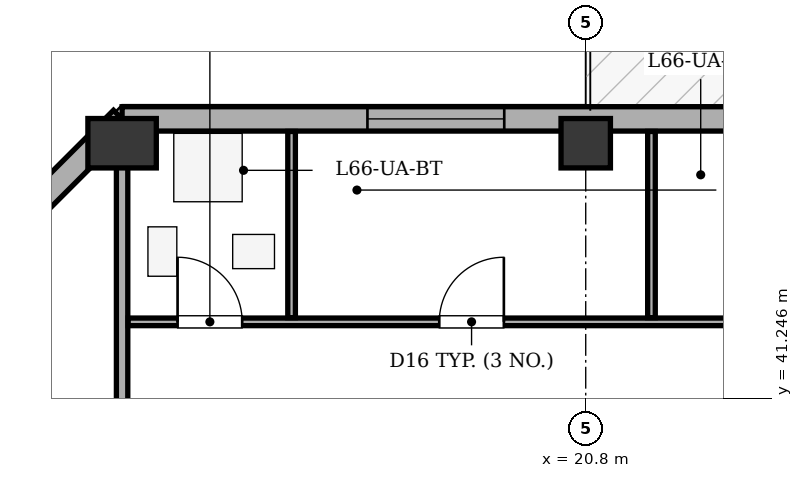
"""IFC4 building model, lengths in metres.
Left out: names, types, materials, properties, quantities, classifications, styles, units other than length and angle.
Written with IfcOpenShell. Run it as: python <this file> out.ifc"""

import sys

from ifc_helpers import new_model, si_unit, direction, frame, frame_2d, origin, origin_2d, place, context, subcontext, project, spatial, rectangle, extrude, element, fill, save


model = new_model("IFC4")
c1 = context("Model", 3, precision=1e-05, world=origin(), true_north=direction((0.0, 1.0)))
c2 = subcontext(c1, "Body", "Model", "MODEL_VIEW")
j1 = project(units=[si_unit("LENGTHUNIT", "METRE"), si_unit("PLANEANGLEUNIT", "RADIAN")], contexts=[c1])
p1 = place(None, origin())
s1 = spatial("IfcSite", under=j1, at=p1, CompositionType="ELEMENT")
p2 = place(p1, origin())
s2 = spatial("IfcBuilding", under=s1, at=p2, CompositionType="ELEMENT")
p3 = place(p2, frame((0.0, 0.0, 251.7)))
s3 = spatial("IfcBuildingStorey", under=s2, at=p3, CompositionType="ELEMENT", Elevation=251.7)
p4 = place(p3, frame((14.7, 44.6, 0.0), z_axis=(0.0, 0.0, 1.0), x_axis=(1.0, 0.0, 0.0)))
e1 = element("IfcColumn", 1, at=p4, inside=s3, PredefinedType="COLUMN", context=c2, shape_type="SweptSolid", body=[
    extrude(rectangle(XDim=0.65, YDim=0.9, at=origin_2d()), origin(), (0.0, 0.0, 1.0), 3.4),
])
p5 = place(p3, frame((20.8, 44.6, 0.0), z_axis=(0.0, 0.0, 1.0), x_axis=(1.0, 0.0, 0.0)))
e2 = element("IfcColumn", 2, at=p5, inside=s3, PredefinedType="COLUMN", context=c2, shape_type="SweptSolid", body=[
    extrude(rectangle(XDim=0.65, YDim=0.65, at=origin_2d()), origin(), (0.0, 0.0, 1.0), 3.4),
])
p6 = place(p3, frame((10.88, 41.1, 0.0), z_axis=(0.0, 0.0, 1.0), x_axis=(0.70712937715, 0.707084184501, 0.0)))
e3 = element("IfcWall", 3, at=p6, inside=s3, PredefinedType="STANDARD", context=c2, shape_type="SweptSolid", body=[
    extrude(rectangle(XDim=5.402, YDim=0.32, at=frame_2d((2.701, 0.0))), origin(), (0.0, 0.0, 1.0), 2.725),
])
p7 = place(p6, frame((2.001, 0.0, 0.75)))
e4 = element("IfcOpeningElement", 4, at=p7, cuts=e3, PredefinedType="OPENING", context=c2, shape_type="SweptSolid", body=[
    extrude(rectangle(XDim=1.4, YDim=1.65, at=frame_2d((0.7, 0.825))), frame((0.0, 0.17, 0.0), z_axis=(0.0, -1.0, 0.0), x_axis=(1.0, 0.0, 0.0)), (0.0, 0.0, 1.0), 0.34),
])
p8 = place(p3, frame((14.7, 44.92, 0.0), z_axis=(0.0, 0.0, 1.0), x_axis=(1.0, 0.0, 0.0)))
e5 = element("IfcWall", 5, at=p8, inside=s3, PredefinedType="STANDARD", context=c2, shape_type="SweptSolid", body=[
    extrude(rectangle(XDim=37.0, YDim=0.32, at=frame_2d((18.5, 0.0))), origin(), (0.0, 0.0, 1.0), 2.725),
])
p9 = place(p8, frame((9.0, 0.0, 0.0)))
e6 = element("IfcOpeningElement", 6, at=p9, cuts=e5, PredefinedType="OPENING", context=c2, shape_type="SweptSolid", body=[
    extrude(rectangle(XDim=1.0, YDim=2.02, at=frame_2d((0.5, 1.01))), frame((0.0, 0.17, 0.0), z_axis=(0.0, -1.0, 0.0), x_axis=(1.0, 0.0, 0.0)), (0.0, 0.0, 1.0), 0.34),
])
p10 = place(p8, frame((3.228, 0.0, 0.75)))
e7 = element("IfcOpeningElement", 7, at=p10, cuts=e5, PredefinedType="OPENING", context=c2, shape_type="SweptSolid", body=[
    extrude(rectangle(XDim=1.8, YDim=1.7, at=frame_2d((0.9, 0.85))), frame((0.0, 0.17, 0.0), z_axis=(0.0, -1.0, 0.0), x_axis=(1.0, 0.0, 0.0)), (0.0, 0.0, 1.0), 0.34),
])
p11 = place(p8, frame((17.392, 0.0, 0.75)))
e8 = element("IfcOpeningElement", 8, at=p11, cuts=e5, PredefinedType="OPENING", context=c2, shape_type="SweptSolid", body=[
    extrude(rectangle(XDim=1.8, YDim=1.7, at=frame_2d((0.9, 0.85))), frame((0.0, 0.17, 0.0), z_axis=(0.0, -1.0, 0.0), x_axis=(1.0, 0.0, 0.0)), (0.0, 0.0, 1.0), 0.34),
])
p12 = place(p8, frame((23.228, 0.0, 0.75)))
e9 = element("IfcOpeningElement", 9, at=p12, cuts=e5, PredefinedType="OPENING", context=c2, shape_type="SweptSolid", body=[
    extrude(rectangle(XDim=1.8, YDim=1.7, at=frame_2d((0.9, 0.85))), frame((0.0, 0.17, 0.0), z_axis=(0.0, -1.0, 0.0), x_axis=(1.0, 0.0, 0.0)), (0.0, 0.0, 1.0), 0.34),
])
p13 = place(p8, frame((27.316, 0.0, 0.75)))
e10 = element("IfcOpeningElement", 10, at=p13, cuts=e5, PredefinedType="OPENING", context=c2, shape_type="SweptSolid", body=[
    extrude(rectangle(XDim=1.8, YDim=1.7, at=frame_2d((0.9, 0.85))), frame((0.0, 0.17, 0.0), z_axis=(0.0, -1.0, 0.0), x_axis=(1.0, 0.0, 0.0)), (0.0, 0.0, 1.0), 0.34),
])
p14 = place(p8, frame((31.315, 0.0, 0.75)))
e11 = element("IfcOpeningElement", 11, at=p14, cuts=e5, PredefinedType="OPENING", context=c2, shape_type="SweptSolid", body=[
    extrude(rectangle(XDim=1.8, YDim=1.7, at=frame_2d((0.9, 0.85))), frame((0.0, 0.17, 0.0), z_axis=(0.0, -1.0, 0.0), x_axis=(1.0, 0.0, 0.0)), (0.0, 0.0, 1.0), 0.34),
])
p15 = place(p8, frame((33.965, 0.0, 0.75)))
e12 = element("IfcOpeningElement", 12, at=p15, cuts=e5, PredefinedType="OPENING", context=c2, shape_type="SweptSolid", body=[
    extrude(rectangle(XDim=1.8, YDim=1.7, at=frame_2d((0.9, 0.85))), frame((0.0, 0.17, 0.0), z_axis=(0.0, -1.0, 0.0), x_axis=(1.0, 0.0, 0.0)), (0.0, 0.0, 1.0), 0.34),
])
p16 = place(p8, frame((11.416, 0.0, 0.75)))
e13 = element("IfcOpeningElement", 13, at=p16, cuts=e5, PredefinedType="OPENING", context=c2, shape_type="SweptSolid", body=[
    extrude(rectangle(XDim=0.75, YDim=1.45, at=frame_2d((0.375, 0.725))), frame((0.0, 0.17, 0.0), z_axis=(0.0, -1.0, 0.0), x_axis=(1.0, 0.0, 0.0)), (0.0, 0.0, 1.0), 0.34),
])
p17 = place(p3, frame((14.7, 36.1, 0.0), z_axis=(0.0, 0.0, 1.0), x_axis=(0.0, 1.0, 0.0)))
e14 = element("IfcWall", 14, at=p17, inside=s3, PredefinedType="PARTITIONING", context=c2, shape_type="SweptSolid", body=[
    extrude(rectangle(XDim=8.655, YDim=0.15, at=frame_2d((4.327, 0.0))), origin(), (0.0, 0.0, 1.0), 3.1),
])
p18 = place(p3, frame((14.78, 42.25, 0.0), z_axis=(0.0, 0.0, 1.0), x_axis=(1.0, 0.0, 0.0)))
e15 = element("IfcWall", 15, at=p18, inside=s3, PredefinedType="PARTITIONING", context=c2, shape_type="SweptSolid", body=[
    extrude(rectangle(XDim=13.889, YDim=0.1, at=frame_2d((6.944, 0.0))), origin(), (0.0, 0.0, 1.0), 3.1),
])
p19 = place(p18, frame((0.65, 0.0, 0.0)))
e16 = element("IfcOpeningElement", 16, at=p19, cuts=e15, PredefinedType="OPENING", context=c2, shape_type="SweptSolid", body=[
    extrude(rectangle(XDim=0.85, YDim=2.05, at=frame_2d((0.425, 1.025))), frame((0.0, 0.06, 0.0), z_axis=(0.0, -1.0, 0.0), x_axis=(1.0, 0.0, 0.0)), (0.0, 0.0, 1.0), 0.12),
])
p20 = place(p18, frame((4.093, 0.0, 0.0)))
e17 = element("IfcOpeningElement", 17, at=p20, cuts=e15, PredefinedType="OPENING", context=c2, shape_type="SweptSolid", body=[
    extrude(rectangle(XDim=0.85, YDim=2.05, at=frame_2d((0.425, 1.025))), frame((0.0, 0.06, 0.0), z_axis=(0.0, -1.0, 0.0), x_axis=(1.0, 0.0, 0.0)), (0.0, 0.0, 1.0), 0.12),
])
p21 = place(p18, frame((8.156, 0.0, 0.0)))
e18 = element("IfcOpeningElement", 18, at=p21, cuts=e15, PredefinedType="OPENING", context=c2, shape_type="SweptSolid", body=[
    extrude(rectangle(XDim=0.9, YDim=2.05, at=frame_2d((0.45, 1.025))), frame((0.0, 0.06, 0.0), z_axis=(0.0, -1.0, 0.0), x_axis=(1.0, 0.0, 0.0)), (0.0, 0.0, 1.0), 0.12),
])
p22 = place(p18, frame((11.598, 0.0, 0.0)))
e19 = element("IfcOpeningElement", 19, at=p22, cuts=e15, PredefinedType="OPENING", context=c2, shape_type="SweptSolid", body=[
    extrude(rectangle(XDim=0.9, YDim=2.05, at=frame_2d((0.45, 1.025))), frame((0.0, 0.06, 0.0), z_axis=(0.0, -1.0, 0.0), x_axis=(1.0, 0.0, 0.0)), (0.0, 0.0, 1.0), 0.12),
])
for number, where, z_axis, x_axis in (
    (20, (16.93, 42.305, 0.0), (0.0, 0.0, 1.0), (0.0, 1.0, 0.0)),
    (21, (21.665, 42.305, 0.0), (0.0, 0.0, 1.0), (0.0, 1.0, 0.0)),
):
    element("IfcWall", number, at=place(p3, frame(where, z_axis=z_axis, x_axis=x_axis)), inside=s3, PredefinedType="PARTITIONING", context=c2, shape_type="SweptSolid", body=[
        extrude(rectangle(XDim=2.45, YDim=0.1, at=frame_2d((1.225, 0.0))), origin(), (0.0, 0.0, 1.0), 3.1),
    ])
p23 = place(p10, origin())
e22 = element("IfcWindow", 22, at=p23, inside=s3, PartitioningType="SINGLE_PANEL", PredefinedType="WINDOW", context=c2, shape_type="SweptSolid", body=[
    extrude(rectangle(XDim=1.8, YDim=1.7, at=frame_2d((0.9, 0.85))), frame((0.0, -0.01, 0.0), z_axis=(0.0, -1.0, 0.0), x_axis=(1.0, 0.0, 0.0)), (0.0, 0.0, 1.0), 0.06),
])
fill(e7, e22)
p24 = place(p19, origin())
e23 = element("IfcDoor", 23, at=p24, inside=s3, OperationType="SINGLE_SWING_LEFT", PredefinedType="DOOR", context=c2, shape_type="SweptSolid", body=[
    extrude(rectangle(XDim=0.85, YDim=2.05, at=frame_2d((0.425, 1.025))), frame((0.0, 0.025, 0.0), z_axis=(0.0, -1.0, 0.0), x_axis=(1.0, 0.0, 0.0)), (0.0, 0.0, 1.0), 0.05),
])
fill(e16, e23)
p25 = place(p20, origin())
e24 = element("IfcDoor", 24, at=p25, inside=s3, OperationType="SINGLE_SWING_RIGHT", PredefinedType="DOOR", context=c2, shape_type="SweptSolid", body=[
    extrude(rectangle(XDim=0.85, YDim=2.05, at=frame_2d((0.425, 1.025))), frame((0.0, 0.025, 0.0), z_axis=(0.0, -1.0, 0.0), x_axis=(1.0, 0.0, 0.0)), (0.0, 0.0, 1.0), 0.05),
])
fill(e17, e24)
save(model, sys.argv[1])
